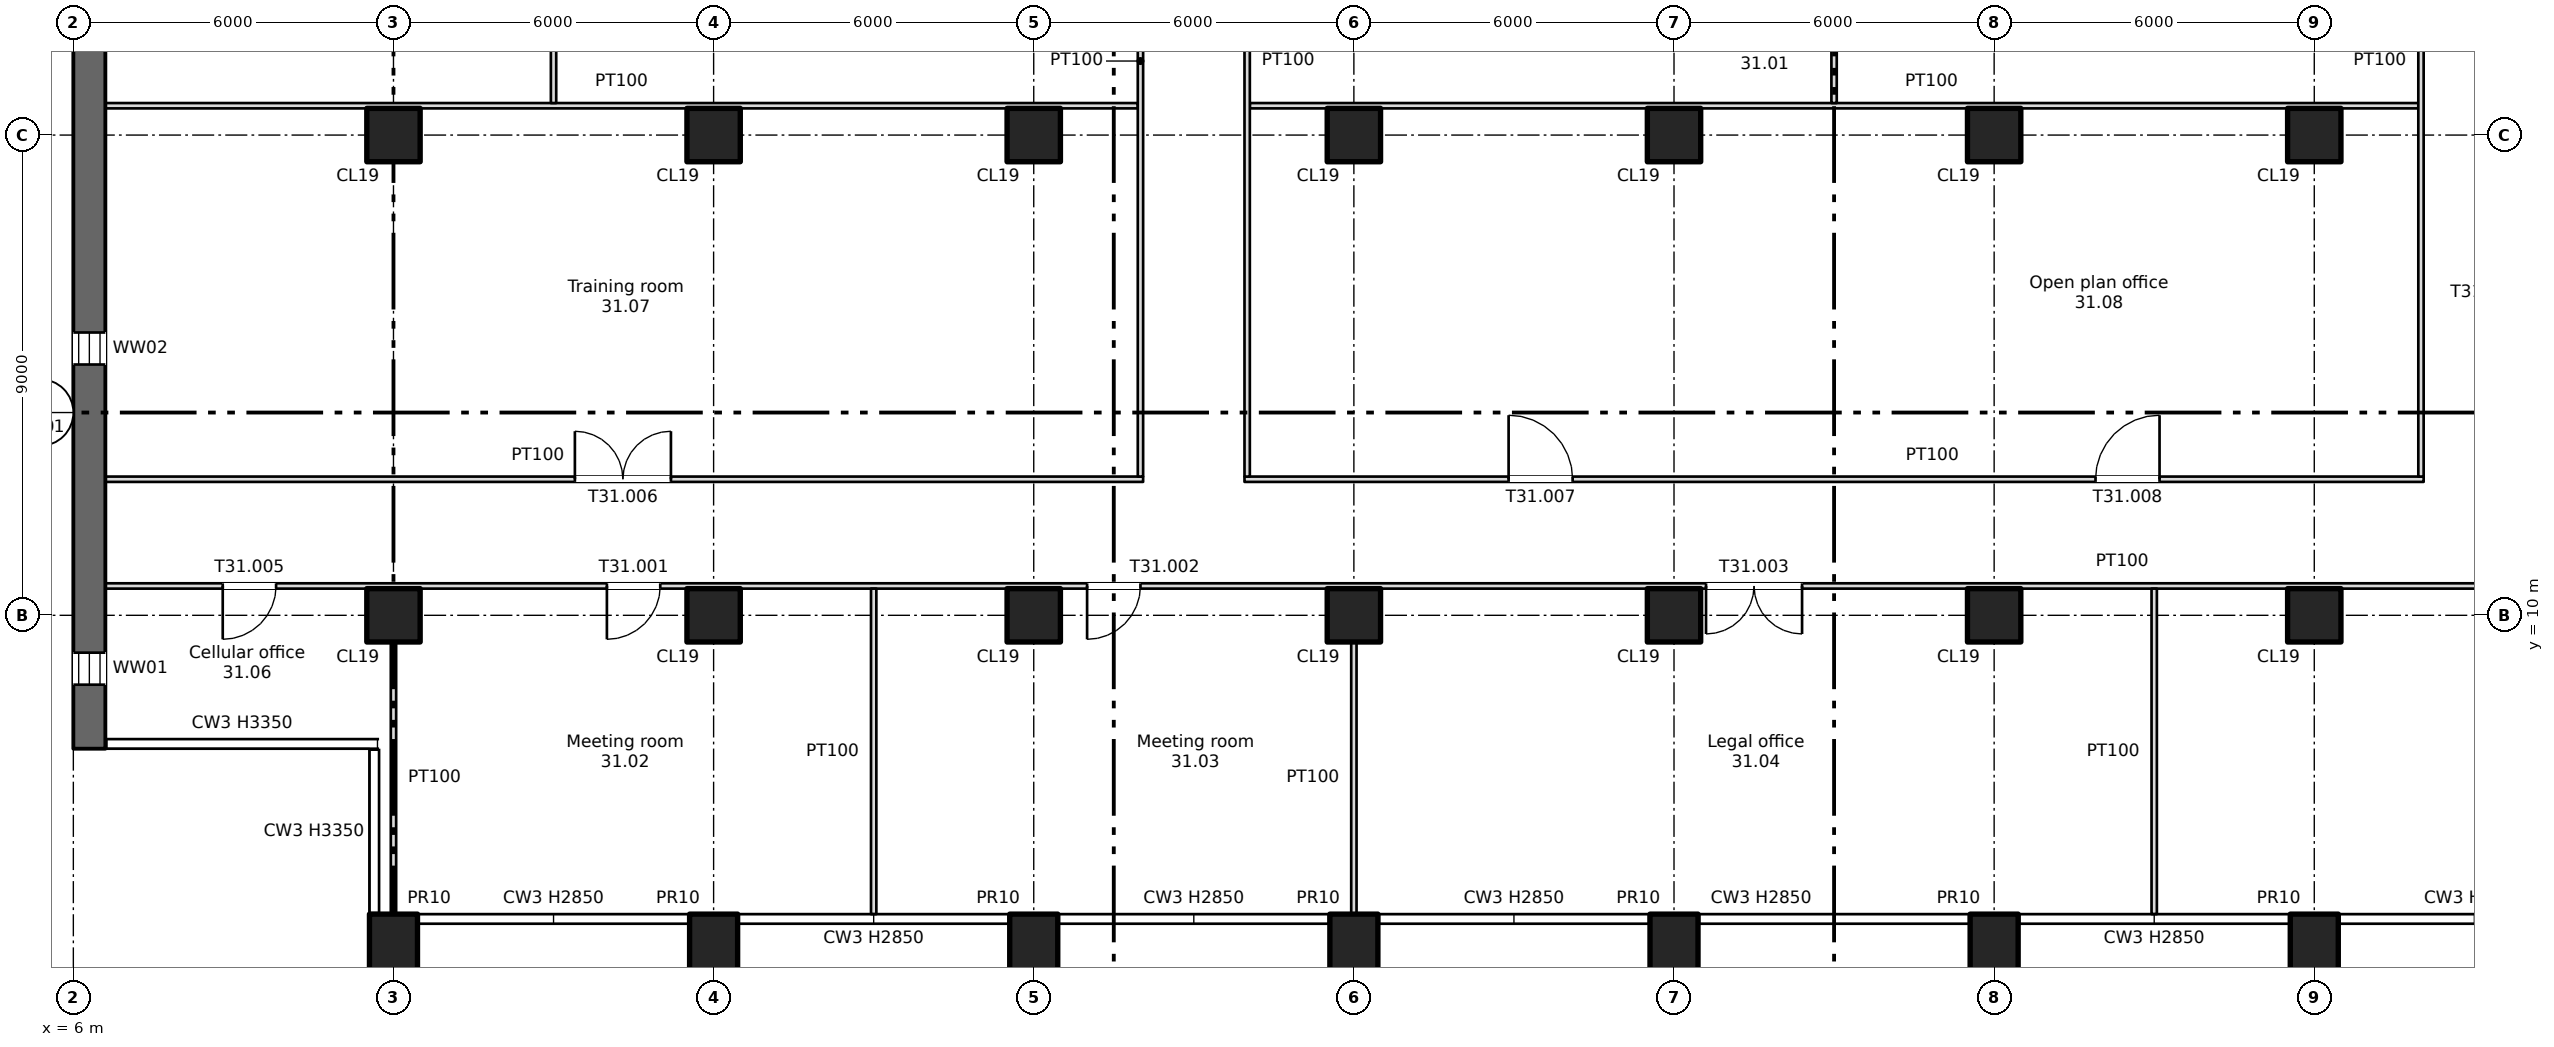
"""IFC4 building model, lengths in metres.
Left out: names, types, materials, properties, quantities, classifications, styles, units other than length and angle.
Written with IfcOpenShell. Run it as: python <this file> out.ifc"""

import sys

from ifc_helpers import new_model, si_unit, direction, frame, frame_2d, origin, origin_2d, place, context, subcontext, project, spatial, rectangle, extrude, element, fill, save


model = new_model("IFC4")
c1 = context("Model", 3, precision=1e-05, world=origin(), true_north=direction((0.0, 1.0)))
c2 = subcontext(c1, "Body", "Model", "MODEL_VIEW")
j1 = project(units=[si_unit("LENGTHUNIT", "METRE"), si_unit("PLANEANGLEUNIT", "RADIAN")], contexts=[c1])
p1 = place(None, origin())
s1 = spatial("IfcSite", under=j1, at=p1, CompositionType="ELEMENT")
p2 = place(p1, origin())
s2 = spatial("IfcBuilding", under=s1, at=p2, CompositionType="ELEMENT")
p3 = place(p2, frame((0.0, 0.0, 215.5)))
s3 = spatial("IfcBuildingStorey", under=s2, at=p3, CompositionType="ELEMENT", Elevation=215.5)
for number, where, z_axis, x_axis in (
    (1, (12.0, 3.7, -0.4), (0.0, 0.0, 1.0), (1.0, 0.0, 0.0)),
    (2, (18.0, 3.7, -0.4), (0.0, 0.0, 1.0), (1.0, 0.0, 0.0)),
    (3, (24.0, 3.7, -0.4), (0.0, 0.0, 1.0), (1.0, 0.0, 0.0)),
    (4, (30.0, 3.7, -0.4), (0.0, 0.0, 1.0), (1.0, 0.0, 0.0)),
    (5, (36.0, 3.7, -0.4), (0.0, 0.0, 1.0), (1.0, 0.0, 0.0)),
    (6, (42.0, 3.7, -0.4), (0.0, 0.0, 1.0), (1.0, 0.0, 0.0)),
    (7, (48.0, 3.7, -0.4), (0.0, 0.0, 1.0), (1.0, 0.0, 0.0)),
):
    element("IfcColumn", number, at=place(p3, frame(where, z_axis=z_axis, x_axis=x_axis)), inside=s3, PredefinedType="COLUMN", context=c2, shape_type="SweptSolid", body=[
        extrude(rectangle(XDim=0.9, YDim=1.4, at=origin_2d()), origin(), (0.0, 0.0, 1.0), 3.75),
    ])
for number, where, z_axis, x_axis in (
    (8, (12.0, 10.0, 0.0), (0.0, 0.0, 1.0), (1.0, 0.0, 0.0)),
    (9, (12.0, 19.0, 0.0), (0.0, 0.0, 1.0), (1.0, 0.0, 0.0)),
    (10, (18.0, 10.0, 0.0), (0.0, 0.0, 1.0), (1.0, 0.0, 0.0)),
    (11, (18.0, 19.0, 0.0), (0.0, 0.0, 1.0), (1.0, 0.0, 0.0)),
    (12, (24.0, 10.0, 0.0), (0.0, 0.0, 1.0), (1.0, 0.0, 0.0)),
    (13, (24.0, 19.0, 0.0), (0.0, 0.0, 1.0), (1.0, 0.0, 0.0)),
    (14, (30.0, 10.0, 0.0), (0.0, 0.0, 1.0), (1.0, 0.0, 0.0)),
    (15, (30.0, 19.0, 0.0), (0.0, 0.0, 1.0), (1.0, 0.0, 0.0)),
    (16, (36.0, 10.0, 0.0), (0.0, 0.0, 1.0), (1.0, 0.0, 0.0)),
    (17, (36.0, 19.0, 0.0), (0.0, 0.0, 1.0), (1.0, 0.0, 0.0)),
    (18, (42.0, 10.0, 0.0), (0.0, 0.0, 1.0), (1.0, 0.0, 0.0)),
    (19, (42.0, 19.0, 0.0), (0.0, 0.0, 1.0), (1.0, 0.0, 0.0)),
    (20, (48.0, 10.0, 0.0), (0.0, 0.0, 1.0), (1.0, 0.0, 0.0)),
    (21, (48.0, 19.0, 0.0), (0.0, 0.0, 1.0), (1.0, 0.0, 0.0)),
):
    element("IfcColumn", number, at=place(p3, frame(where, z_axis=z_axis, x_axis=x_axis)), inside=s3, PredefinedType="COLUMN", context=c2, shape_type="SweptSolid", body=[
        extrude(rectangle(XDim=1.0, YDim=1.0, at=origin_2d()), origin(), (0.0, 0.0, 1.0), 3.35),
    ])
p4 = place(p3, frame((6.3, 7.5, 0.0), z_axis=(0.0, 0.0, 1.0), x_axis=(0.0, 1.0, 0.0)))
e22 = element("IfcWall", 22, at=p4, inside=s3, PredefinedType="SHEAR", context=c2, shape_type="SweptSolid", body=[
    extrude(rectangle(XDim=34.0, YDim=0.6, at=frame_2d((17.0, 0.0))), origin(), (0.0, 0.0, 1.0), 3.35),
])
p5 = place(p4, frame((1.2, 0.0, 0.6)))
e23 = element("IfcOpeningElement", 23, at=p5, cuts=e22, PredefinedType="OPENING", context=c2, shape_type="SweptSolid", body=[
    extrude(rectangle(XDim=0.6, YDim=2.4, at=frame_2d((0.3, 1.2))), frame((0.0, 0.31, 0.0), z_axis=(0.0, -1.0, 0.0), x_axis=(1.0, 0.0, 0.0)), (0.0, 0.0, 1.0), 0.62),
])
p6 = place(p4, frame((7.2, 0.0, 0.6)))
e24 = element("IfcOpeningElement", 24, at=p6, cuts=e22, PredefinedType="OPENING", context=c2, shape_type="SweptSolid", body=[
    extrude(rectangle(XDim=0.6, YDim=2.4, at=frame_2d((0.3, 1.2))), frame((0.0, 0.31, 0.0), z_axis=(0.0, -1.0, 0.0), x_axis=(1.0, 0.0, 0.0)), (0.0, 0.0, 1.0), 0.62),
])
p7 = place(p4, frame((13.2, 0.0, 0.6)))
e25 = element("IfcOpeningElement", 25, at=p7, cuts=e22, PredefinedType="OPENING", context=c2, shape_type="SweptSolid", body=[
    extrude(rectangle(XDim=0.6, YDim=2.4, at=frame_2d((0.3, 1.2))), frame((0.0, 0.31, 0.0), z_axis=(0.0, -1.0, 0.0), x_axis=(1.0, 0.0, 0.0)), (0.0, 0.0, 1.0), 0.62),
])
p8 = place(p4, frame((19.2, 0.0, 0.6)))
e26 = element("IfcOpeningElement", 26, at=p8, cuts=e22, PredefinedType="OPENING", context=c2, shape_type="SweptSolid", body=[
    extrude(rectangle(XDim=0.6, YDim=2.4, at=frame_2d((0.3, 1.2))), frame((0.0, 0.31, 0.0), z_axis=(0.0, -1.0, 0.0), x_axis=(1.0, 0.0, 0.0)), (0.0, 0.0, 1.0), 0.62),
])
p9 = place(p3, frame((6.6, 10.55, 0.0), z_axis=(0.0, 0.0, 1.0), x_axis=(1.0, 0.0, 0.0)))
e27 = element("IfcWall", 27, at=p9, inside=s3, PredefinedType="PARTITIONING", context=c2, shape_type="SweptSolid", body=[
    extrude(rectangle(XDim=64.8, YDim=0.1, at=frame_2d((32.4, 0.0))), origin(), (0.0, 0.0, 1.0), 3.35),
])
p10 = place(p9, frame((9.4, 0.0, 0.0)))
e28 = element("IfcOpeningElement", 28, at=p10, cuts=e27, PredefinedType="OPENING", context=c2, shape_type="SweptSolid", body=[
    extrude(rectangle(XDim=1.0, YDim=2.1, at=frame_2d((0.5, 1.05))), frame((0.0, 0.06, 0.0), z_axis=(0.0, -1.0, 0.0), x_axis=(1.0, 0.0, 0.0)), (0.0, 0.0, 1.0), 0.12),
])
p11 = place(p9, frame((18.4, 0.0, 0.0)))
e29 = element("IfcOpeningElement", 29, at=p11, cuts=e27, PredefinedType="OPENING", context=c2, shape_type="SweptSolid", body=[
    extrude(rectangle(XDim=1.0, YDim=2.1, at=frame_2d((0.5, 1.05))), frame((0.0, 0.06, 0.0), z_axis=(0.0, -1.0, 0.0), x_axis=(1.0, 0.0, 0.0)), (0.0, 0.0, 1.0), 0.12),
])
p12 = place(p9, frame((30.0, 0.0, 0.0)))
e30 = element("IfcOpeningElement", 30, at=p12, cuts=e27, PredefinedType="OPENING", context=c2, shape_type="SweptSolid", body=[
    extrude(rectangle(XDim=1.8, YDim=2.1, at=frame_2d((0.9, 1.05))), frame((0.0, 0.06, 0.0), z_axis=(0.0, -1.0, 0.0), x_axis=(1.0, 0.0, 0.0)), (0.0, 0.0, 1.0), 0.12),
])
p13 = place(p9, frame((50.7, 0.0, 0.0)))
e31 = element("IfcOpeningElement", 31, at=p13, cuts=e27, PredefinedType="OPENING", context=c2, shape_type="SweptSolid", body=[
    extrude(rectangle(XDim=1.8, YDim=2.1, at=frame_2d((0.9, 1.05))), frame((0.0, 0.06, 0.0), z_axis=(0.0, -1.0, 0.0), x_axis=(1.0, 0.0, 0.0)), (0.0, 0.0, 1.0), 0.12),
])
p14 = place(p9, frame((2.2, 0.0, 0.0)))
e32 = element("IfcOpeningElement", 32, at=p14, cuts=e27, PredefinedType="OPENING", context=c2, shape_type="SweptSolid", body=[
    extrude(rectangle(XDim=1.0, YDim=2.1, at=frame_2d((0.5, 1.05))), frame((0.0, 0.06, 0.0), z_axis=(0.0, -1.0, 0.0), x_axis=(1.0, 0.0, 0.0)), (0.0, 0.0, 1.0), 0.12),
])
p15 = place(p3, frame((6.6, 12.55, 0.0), z_axis=(0.0, 0.0, 1.0), x_axis=(1.0, 0.0, 0.0)))
e33 = element("IfcWall", 33, at=p15, inside=s3, PredefinedType="PARTITIONING", context=c2, shape_type="SweptSolid", body=[
    extrude(rectangle(XDim=19.45, YDim=0.1, at=frame_2d((9.725, 0.0))), origin(), (0.0, 0.0, 1.0), 3.35),
])
p16 = place(p15, frame((8.8, 0.0, 0.0)))
e34 = element("IfcOpeningElement", 34, at=p16, cuts=e33, PredefinedType="OPENING", context=c2, shape_type="SweptSolid", body=[
    extrude(rectangle(XDim=1.8, YDim=2.1, at=frame_2d((0.9, 1.05))), frame((0.0, 0.06, 0.0), z_axis=(0.0, -1.0, 0.0), x_axis=(1.0, 0.0, 0.0)), (0.0, 0.0, 1.0), 0.12),
])
p17 = place(p3, frame((27.95, 12.55, 0.0), z_axis=(0.0, 0.0, 1.0), x_axis=(1.0, 0.0, 0.0)))
e35 = element("IfcWall", 35, at=p17, inside=s3, PredefinedType="PARTITIONING", context=c2, shape_type="SweptSolid", body=[
    extrude(rectangle(XDim=22.1, YDim=0.1, at=frame_2d((11.05, 0.0))), origin(), (0.0, 0.0, 1.0), 3.35),
])
p18 = place(p17, frame((4.95, 0.0, 0.0)))
e36 = element("IfcOpeningElement", 36, at=p18, cuts=e35, PredefinedType="OPENING", context=c2, shape_type="SweptSolid", body=[
    extrude(rectangle(XDim=1.2, YDim=2.1, at=frame_2d((0.6, 1.05))), frame((0.0, 0.06, 0.0), z_axis=(0.0, -1.0, 0.0), x_axis=(1.0, 0.0, 0.0)), (0.0, 0.0, 1.0), 0.12),
])
p19 = place(p17, frame((15.95, 0.0, 0.0)))
e37 = element("IfcOpeningElement", 37, at=p19, cuts=e35, PredefinedType="OPENING", context=c2, shape_type="SweptSolid", body=[
    extrude(rectangle(XDim=1.2, YDim=2.1, at=frame_2d((0.6, 1.05))), frame((0.0, 0.06, 0.0), z_axis=(0.0, -1.0, 0.0), x_axis=(1.0, 0.0, 0.0)), (0.0, 0.0, 1.0), 0.12),
])
p20 = place(p3, frame((6.6, 19.55, 0.0), z_axis=(0.0, 0.0, 1.0), x_axis=(1.0, 0.0, 0.0)))
e38 = element("IfcWall", 38, at=p20, inside=s3, PredefinedType="PARTITIONING", context=c2, shape_type="SweptSolid", body=[
    extrude(rectangle(XDim=19.35, YDim=0.1, at=frame_2d((9.675, 0.0))), origin(), (0.0, 0.0, 1.0), 3.35),
])
p21 = place(p3, frame((28.05, 19.55, 0.0), z_axis=(0.0, 0.0, 1.0), x_axis=(1.0, 0.0, 0.0)))
e39 = element("IfcWall", 39, at=p21, inside=s3, PredefinedType="PARTITIONING", context=c2, shape_type="SweptSolid", body=[
    extrude(rectangle(XDim=21.9, YDim=0.1, at=frame_2d((10.95, 0.0))), origin(), (0.0, 0.0, 1.0), 3.35),
])
p22 = place(p3, frame((12.0, 4.4, 0.0), z_axis=(0.0, 0.0, 1.0), x_axis=(0.0, 1.0, 0.0)))
e40 = element("IfcWall", 40, at=p22, inside=s3, PredefinedType="PARTITIONING", context=c2, shape_type="SweptSolid", body=[
    extrude(rectangle(XDim=5.1, YDim=0.1, at=frame_2d((2.55, 0.0))), origin(), (0.0, 0.0, 1.0), 3.35),
])
p23 = place(p3, frame((15.0, 19.6, 0.0), z_axis=(0.0, 0.0, 1.0), x_axis=(0.0, 1.0, 0.0)))
e41 = element("IfcWall", 41, at=p23, inside=s3, PredefinedType="PARTITIONING", context=c2, shape_type="SweptSolid", body=[
    extrude(rectangle(XDim=6.35, YDim=0.1, at=frame_2d((3.175, 0.0))), origin(), (0.0, 0.0, 1.0), 3.35),
])
p24 = place(p3, frame((21.0, 4.4, 0.0), z_axis=(0.0, 0.0, 1.0), x_axis=(0.0, 1.0, 0.0)))
e42 = element("IfcWall", 42, at=p24, inside=s3, PredefinedType="PARTITIONING", context=c2, shape_type="SweptSolid", body=[
    extrude(rectangle(XDim=6.1, YDim=0.1, at=frame_2d((3.05, 0.0))), origin(), (0.0, 0.0, 1.0), 3.35),
])
for number, where, z_axis, x_axis in (
    (43, (26.0, 12.6, 0.0), (0.0, 0.0, 1.0), (0.0, 1.0, 0.0)),
    (44, (28.0, 12.6, 0.0), (0.0, 0.0, 1.0), (0.0, 1.0, 0.0)),
):
    element("IfcWall", number, at=place(p3, frame(where, z_axis=z_axis, x_axis=x_axis)), inside=s3, PredefinedType="PARTITIONING", context=c2, shape_type="SweptSolid", body=[
        extrude(rectangle(XDim=13.35, YDim=0.1, at=frame_2d((6.675, 0.0))), origin(), (0.0, 0.0, 1.0), 3.35),
    ])
p25 = place(p3, frame((30.0, 4.4, 0.0), z_axis=(0.0, 0.0, 1.0), x_axis=(0.0, 1.0, 0.0)))
e45 = element("IfcWall", 45, at=p25, inside=s3, PredefinedType="PARTITIONING", context=c2, shape_type="SweptSolid", body=[
    extrude(rectangle(XDim=5.1, YDim=0.1, at=frame_2d((2.55, 0.0))), origin(), (0.0, 0.0, 1.0), 3.35),
])
p26 = place(p3, frame((39.0, 19.6, 0.0), z_axis=(0.0, 0.0, 1.0), x_axis=(0.0, 1.0, 0.0)))
e46 = element("IfcWall", 46, at=p26, inside=s3, PredefinedType="PARTITIONING", context=c2, shape_type="SweptSolid", body=[
    extrude(rectangle(XDim=6.35, YDim=0.1, at=frame_2d((3.175, 0.0))), origin(), (0.0, 0.0, 1.0), 3.35),
])
p27 = place(p3, frame((45.0, 4.4, 0.0), z_axis=(0.0, 0.0, 1.0), x_axis=(0.0, 1.0, 0.0)))
e47 = element("IfcWall", 47, at=p27, inside=s3, PredefinedType="PARTITIONING", context=c2, shape_type="SweptSolid", body=[
    extrude(rectangle(XDim=6.1, YDim=0.1, at=frame_2d((3.05, 0.0))), origin(), (0.0, 0.0, 1.0), 3.35),
])
p28 = place(p3, frame((50.0, 12.6, 0.0), z_axis=(0.0, 0.0, 1.0), x_axis=(0.0, 1.0, 0.0)))
e48 = element("IfcWall", 48, at=p28, inside=s3, PredefinedType="PARTITIONING", context=c2, shape_type="SweptSolid", body=[
    extrude(rectangle(XDim=13.35, YDim=0.1, at=frame_2d((6.675, 0.0))), origin(), (0.0, 0.0, 1.0), 3.35),
])
p29 = place(p5, origin())
e49 = element("IfcWindow", 49, at=p29, inside=s3, PartitioningType="SINGLE_PANEL", PredefinedType="WINDOW", context=c2, shape_type="SweptSolid", body=[
    extrude(rectangle(XDim=0.6, YDim=2.4, at=frame_2d((0.3, 1.2))), frame((0.0, 0.03, 0.0), z_axis=(0.0, -1.0, 0.0), x_axis=(1.0, 0.0, 0.0)), (0.0, 0.0, 1.0), 0.06),
])
fill(e23, e49)
p30 = place(p6, origin())
e50 = element("IfcWindow", 50, at=p30, inside=s3, PartitioningType="SINGLE_PANEL", PredefinedType="WINDOW", context=c2, shape_type="SweptSolid", body=[
    extrude(rectangle(XDim=0.6, YDim=2.4, at=frame_2d((0.3, 1.2))), frame((0.0, 0.03, 0.0), z_axis=(0.0, -1.0, 0.0), x_axis=(1.0, 0.0, 0.0)), (0.0, 0.0, 1.0), 0.06),
])
fill(e24, e50)
p31 = place(p10, origin())
e51 = element("IfcDoor", 51, at=p31, inside=s3, OperationType="SINGLE_SWING_LEFT", PredefinedType="DOOR", context=c2, shape_type="SweptSolid", body=[
    extrude(rectangle(XDim=1.0, YDim=2.1, at=frame_2d((0.5, 1.05))), frame((0.0, 0.025, 0.0), z_axis=(0.0, -1.0, 0.0), x_axis=(1.0, 0.0, 0.0)), (0.0, 0.0, 1.0), 0.05),
])
fill(e28, e51)
p32 = place(p11, origin())
e52 = element("IfcDoor", 52, at=p32, inside=s3, OperationType="SINGLE_SWING_LEFT", PredefinedType="DOOR", context=c2, shape_type="SweptSolid", body=[
    extrude(rectangle(XDim=1.0, YDim=2.1, at=frame_2d((0.5, 1.05))), frame((0.0, 0.025, 0.0), z_axis=(0.0, -1.0, 0.0), x_axis=(1.0, 0.0, 0.0)), (0.0, 0.0, 1.0), 0.05),
])
fill(e29, e52)
p33 = place(p12, origin())
e53 = element("IfcDoor", 53, at=p33, inside=s3, OperationType="DOUBLE_DOOR_SINGLE_SWING", PredefinedType="DOOR", context=c2, shape_type="SweptSolid", body=[
    extrude(rectangle(XDim=1.8, YDim=2.1, at=frame_2d((0.9, 1.05))), frame((0.0, 0.025, 0.0), z_axis=(0.0, -1.0, 0.0), x_axis=(1.0, 0.0, 0.0)), (0.0, 0.0, 1.0), 0.05),
])
fill(e30, e53)
p34 = place(p14, origin())
e54 = element("IfcDoor", 54, at=p34, inside=s3, OperationType="SINGLE_SWING_LEFT", PredefinedType="DOOR", context=c2, shape_type="SweptSolid", body=[
    extrude(rectangle(XDim=1.0, YDim=2.1, at=frame_2d((0.5, 1.05))), frame((0.0, 0.025, 0.0), z_axis=(0.0, -1.0, 0.0), x_axis=(1.0, 0.0, 0.0)), (0.0, 0.0, 1.0), 0.05),
])
fill(e32, e54)
p35 = place(p16, origin())
e55 = element("IfcDoor", 55, at=p35, inside=s3, OperationType="DOUBLE_DOOR_SINGLE_SWING", PredefinedType="DOOR", context=c2, shape_type="SweptSolid", body=[
    extrude(rectangle(XDim=1.8, YDim=2.1, at=frame_2d((0.9, 1.05))), frame((0.0, 0.025, 0.0), z_axis=(0.0, -1.0, 0.0), x_axis=(1.0, 0.0, 0.0)), (0.0, 0.0, 1.0), 0.05),
])
fill(e34, e55)
p36 = place(p18, origin())
e56 = element("IfcDoor", 56, at=p36, inside=s3, OperationType="SINGLE_SWING_LEFT", PredefinedType="DOOR", context=c2, shape_type="SweptSolid", body=[
    extrude(rectangle(XDim=1.2, YDim=2.1, at=frame_2d((0.6, 1.05))), frame((0.0, 0.025, 0.0), z_axis=(0.0, -1.0, 0.0), x_axis=(1.0, 0.0, 0.0)), (0.0, 0.0, 1.0), 0.05),
])
fill(e36, e56)
p37 = place(p19, origin())
e57 = element("IfcDoor", 57, at=p37, inside=s3, OperationType="SINGLE_SWING_RIGHT", PredefinedType="DOOR", context=c2, shape_type="SweptSolid", body=[
    extrude(rectangle(XDim=1.2, YDim=2.1, at=frame_2d((0.6, 1.05))), frame((0.0, 0.025, 0.0), z_axis=(0.0, -1.0, 0.0), x_axis=(1.0, 0.0, 0.0)), (0.0, 0.0, 1.0), 0.05),
])
fill(e37, e57)
save(model, sys.argv[1])
